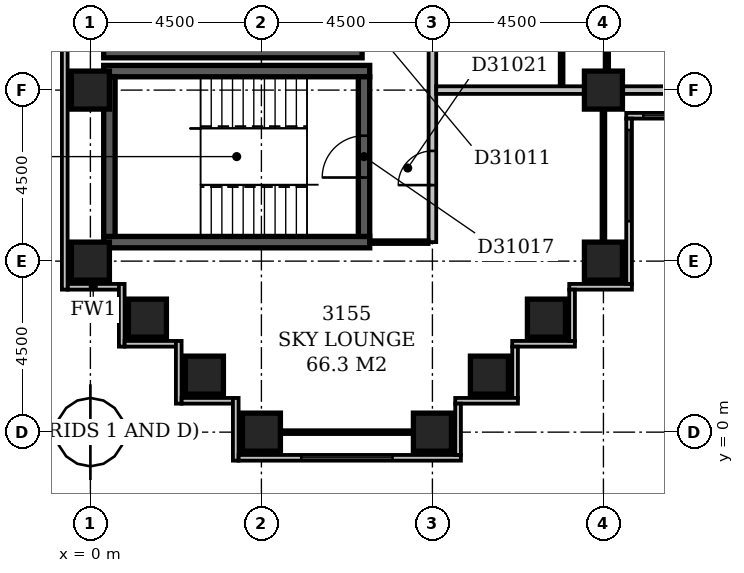
"""IFC4 building model, lengths in metres.
Left out: names, types, materials, properties, quantities, classifications, styles, units other than length and angle.
Written with IfcOpenShell. Run it as: python <this file> out.ifc"""

import sys

from ifc_helpers import new_model, si_unit, direction, frame, frame_2d, origin, origin_2d, place, context, subcontext, project, spatial, rectangle, extrude, element, fill, save


model = new_model("IFC4")
c1 = context("Model", 3, precision=1e-05, world=origin(), true_north=direction((0.0, 1.0)))
c2 = subcontext(c1, "Body", "Model", "MODEL_VIEW")
j1 = project(units=[si_unit("LENGTHUNIT", "METRE"), si_unit("PLANEANGLEUNIT", "RADIAN")], contexts=[c1])
p1 = place(None, origin())
s1 = spatial("IfcSite", under=j1, at=p1, CompositionType="ELEMENT")
p2 = place(p1, origin())
s2 = spatial("IfcBuilding", under=s1, at=p2, CompositionType="ELEMENT")
p3 = place(p2, frame((0.0, 0.0, 126.8)))
s3 = spatial("IfcBuildingStorey", under=s2, at=p3, CompositionType="ELEMENT", Elevation=126.8)
for number, where, z_axis, x_axis in (
    (1, (0.35, 5.0, -0.3), (0.0, 0.0, 1.0), (1.0, 0.0, 0.0)),
    (2, (0.35, 9.5, -0.3), (0.0, 0.0, 1.0), (1.0, 0.0, 0.0)),
):
    element("IfcWall", number, at=place(p3, frame(where, z_axis=z_axis, x_axis=x_axis)), inside=s3, PredefinedType="SHEAR", context=c2, shape_type="SweptSolid", body=[
        extrude(rectangle(XDim=7.0, YDim=0.3, at=frame_2d((3.5, 0.0))), origin(), (0.0, 0.0, 1.0), 3.6),
    ])
p4 = place(p3, frame((0.35, 10.0, -0.3), z_axis=(0.0, 0.0, 1.0), x_axis=(1.0, 0.0, 0.0)))
e3 = element("IfcWall", 3, at=p4, inside=s3, PredefinedType="SHEAR", context=c2, shape_type="SweptSolid", body=[
    extrude(rectangle(XDim=6.8, YDim=0.3, at=frame_2d((3.4, 0.0))), origin(), (0.0, 0.0, 1.0), 3.6),
])
p5 = place(p3, frame((0.5, 5.15, -0.3), z_axis=(0.0, 0.0, 1.0), x_axis=(0.0, 1.0, 0.0)))
e4 = element("IfcWall", 4, at=p5, inside=s3, PredefinedType="SHEAR", context=c2, shape_type="SweptSolid", body=[
    extrude(rectangle(XDim=4.2, YDim=0.3, at=frame_2d((2.1, 0.0))), origin(), (0.0, 0.0, 1.0), 3.6),
])
p6 = place(p3, frame((7.2, 5.15, -0.3), z_axis=(0.0, 0.0, 1.0), x_axis=(0.0, 1.0, 0.0)))
e5 = element("IfcWall", 5, at=p6, inside=s3, PredefinedType="SHEAR", context=c2, shape_type="SweptSolid", body=[
    extrude(rectangle(XDim=4.2, YDim=0.3, at=frame_2d((2.1, 0.0))), origin(), (0.0, 0.0, 1.0), 3.6),
])
p7 = place(p6, frame((1.55, 0.0, 0.3)))
e6 = element("IfcOpeningElement", 6, at=p7, cuts=e5, PredefinedType="OPENING", context=c2, shape_type="SweptSolid", body=[
    extrude(rectangle(XDim=1.1, YDim=2.1, at=frame_2d((0.55, 1.05))), frame((0.0, 0.162, 0.0), z_axis=(0.0, -1.0, 0.0), x_axis=(1.0, 0.0, 0.0)), (0.0, 0.0, 1.0), 0.324),
])
for number, where, z_axis, x_axis in (
    (7, (4.5, 0.0, -0.3), (0.0, 0.0, 1.0), (1.0, 0.0, 0.0)),
    (8, (9.0, 0.0, -0.3), (0.0, 0.0, 1.0), (1.0, 0.0, 0.0)),
    (9, (3.0, 1.5, -0.3), (0.0, 0.0, 1.0), (1.0, 0.0, 0.0)),
    (10, (10.5, 1.5, -0.3), (0.0, 0.0, 1.0), (1.0, 0.0, 0.0)),
    (11, (1.5, 3.0, -0.3), (0.0, 0.0, 1.0), (1.0, 0.0, 0.0)),
    (12, (12.0, 3.0, -0.3), (0.0, 0.0, 1.0), (1.0, 0.0, 0.0)),
    (13, (0.0, 4.5, -0.3), (0.0, 0.0, 1.0), (1.0, 0.0, 0.0)),
    (14, (13.5, 4.5, -0.3), (0.0, 0.0, 1.0), (1.0, 0.0, 0.0)),
    (15, (0.0, 9.0, -0.3), (0.0, 0.0, 1.0), (1.0, 0.0, 0.0)),
    (16, (13.5, 9.0, -0.3), (0.0, 0.0, 1.0), (1.0, 0.0, 0.0)),
):
    element("IfcColumn", number, at=place(p3, frame(where, z_axis=z_axis, x_axis=x_axis)), inside=s3, PredefinedType="COLUMN", context=c2, shape_type="SweptSolid", body=[
        extrude(rectangle(XDim=1.0, YDim=1.0, at=origin_2d()), origin(), (0.0, 0.0, 1.0), 3.6),
    ])
p8 = place(p3, frame((9.675, -0.6, 0.0), z_axis=(0.0, 0.0, 1.0), x_axis=(0.0, 1.0, 0.0)))
e17 = element("IfcWall", 17, at=p8, inside=s3, PredefinedType="STANDARD", context=c2, shape_type="SweptSolid", body=[
    extrude(rectangle(XDim=1.35, YDim=0.15, at=frame_2d((0.675, 0.0))), origin(), (0.0, 0.0, 1.0), 2.7),
])
p9 = place(p3, frame((9.6, 0.825, 0.0), z_axis=(0.0, 0.0, 1.0), x_axis=(1.0, 0.0, 0.0)))
e18 = element("IfcWall", 18, at=p9, inside=s3, PredefinedType="STANDARD", context=c2, shape_type="SweptSolid", body=[
    extrude(rectangle(XDim=1.65, YDim=0.15, at=frame_2d((0.825, 0.0))), origin(), (0.0, 0.0, 1.0), 2.7),
])
p10 = place(p3, frame((11.175, 0.9, 0.0), z_axis=(0.0, 0.0, 1.0), x_axis=(0.0, 1.0, 0.0)))
e19 = element("IfcWall", 19, at=p10, inside=s3, PredefinedType="STANDARD", context=c2, shape_type="SweptSolid", body=[
    extrude(rectangle(XDim=1.35, YDim=0.15, at=frame_2d((0.675, 0.0))), origin(), (0.0, 0.0, 1.0), 2.7),
])
p11 = place(p3, frame((11.1, 2.325, 0.0), z_axis=(0.0, 0.0, 1.0), x_axis=(1.0, 0.0, 0.0)))
e20 = element("IfcWall", 20, at=p11, inside=s3, PredefinedType="STANDARD", context=c2, shape_type="SweptSolid", body=[
    extrude(rectangle(XDim=1.65, YDim=0.15, at=frame_2d((0.825, 0.0))), origin(), (0.0, 0.0, 1.0), 2.7),
])
p12 = place(p3, frame((12.675, 2.4, 0.0), z_axis=(0.0, 0.0, 1.0), x_axis=(0.0, 1.0, 0.0)))
e21 = element("IfcWall", 21, at=p12, inside=s3, PredefinedType="STANDARD", context=c2, shape_type="SweptSolid", body=[
    extrude(rectangle(XDim=1.35, YDim=0.15, at=frame_2d((0.675, 0.0))), origin(), (0.0, 0.0, 1.0), 2.7),
])
p13 = place(p3, frame((12.6, 3.825, 0.0), z_axis=(0.0, 0.0, 1.0), x_axis=(1.0, 0.0, 0.0)))
e22 = element("IfcWall", 22, at=p13, inside=s3, PredefinedType="STANDARD", context=c2, shape_type="SweptSolid", body=[
    extrude(rectangle(XDim=1.65, YDim=0.15, at=frame_2d((0.825, 0.0))), origin(), (0.0, 0.0, 1.0), 2.7),
])
p14 = place(p3, frame((14.175, 3.9, 0.0), z_axis=(0.0, 0.0, 1.0), x_axis=(0.0, 1.0, 0.0)))
e23 = element("IfcWall", 23, at=p14, inside=s3, PredefinedType="STANDARD", context=c2, shape_type="SweptSolid", body=[
    extrude(rectangle(XDim=4.35, YDim=0.15, at=frame_2d((2.175, 0.0))), origin(), (0.0, 0.0, 1.0), 2.7),
])
p15 = place(p14, frame((1.65, 0.0, 0.6)))
e24 = element("IfcOpeningElement", 24, at=p15, cuts=e23, PredefinedType="OPENING", context=c2, shape_type="SweptSolid", body=[
    extrude(rectangle(XDim=2.4, YDim=1.8, at=frame_2d((1.2, 0.9))), frame((0.0, 0.087, 0.0), z_axis=(0.0, -1.0, 0.0), x_axis=(1.0, 0.0, 0.0)), (0.0, 0.0, 1.0), 0.174),
])
p16 = place(p3, frame((14.1, 8.325, 0.0), z_axis=(0.0, 0.0, 1.0), x_axis=(1.0, 0.0, 0.0)))
e25 = element("IfcWall", 25, at=p16, inside=s3, PredefinedType="STANDARD", context=c2, shape_type="SweptSolid", body=[
    extrude(rectangle(XDim=4.65, YDim=0.15, at=frame_2d((2.325, 0.0))), origin(), (0.0, 0.0, 1.0), 2.7),
])
p17 = place(p16, frame((0.45, 0.0, 0.6)))
e26 = element("IfcOpeningElement", 26, at=p17, cuts=e25, PredefinedType="OPENING", context=c2, shape_type="SweptSolid", body=[
    extrude(rectangle(XDim=2.4, YDim=1.8, at=frame_2d((1.2, 0.9))), frame((0.0, 0.087, 0.0), z_axis=(0.0, -1.0, 0.0), x_axis=(1.0, 0.0, 0.0)), (0.0, 0.0, 1.0), 0.174),
])
p18 = place(p3, frame((-0.675, 59.1, 0.0), z_axis=(0.0, 0.0, 1.0), x_axis=(0.0, -1.0, 0.0)))
e27 = element("IfcWall", 27, at=p18, inside=s3, PredefinedType="STANDARD", context=c2, shape_type="SweptSolid", body=[
    extrude(rectangle(XDim=55.35, YDim=0.15, at=frame_2d((27.675, 0.0))), origin(), (0.0, 0.0, 1.0), 2.7),
])
p19 = place(p18, frame((42.15, 0.0, 0.6)))
e28 = element("IfcOpeningElement", 28, at=p19, cuts=e27, PredefinedType="OPENING", context=c2, shape_type="SweptSolid", body=[
    extrude(rectangle(XDim=2.4, YDim=1.8, at=frame_2d((1.2, 0.9))), frame((0.0, 0.087, 0.0), z_axis=(0.0, -1.0, 0.0), x_axis=(1.0, 0.0, 0.0)), (0.0, 0.0, 1.0), 0.174),
])
p20 = place(p3, frame((-0.6, 3.825, 0.0), z_axis=(0.0, 0.0, 1.0), x_axis=(1.0, 0.0, 0.0)))
e29 = element("IfcWall", 29, at=p20, inside=s3, PredefinedType="STANDARD", context=c2, shape_type="SweptSolid", body=[
    extrude(rectangle(XDim=1.35, YDim=0.15, at=frame_2d((0.675, 0.0))), origin(), (0.0, 0.0, 1.0), 2.7),
])
p21 = place(p3, frame((0.825, 3.9, 0.0), z_axis=(0.0, 0.0, 1.0), x_axis=(0.0, -1.0, 0.0)))
e30 = element("IfcWall", 30, at=p21, inside=s3, PredefinedType="STANDARD", context=c2, shape_type="SweptSolid", body=[
    extrude(rectangle(XDim=1.65, YDim=0.15, at=frame_2d((0.825, 0.0))), origin(), (0.0, 0.0, 1.0), 2.7),
])
p22 = place(p3, frame((0.9, 2.325, 0.0), z_axis=(0.0, 0.0, 1.0), x_axis=(1.0, 0.0, 0.0)))
e31 = element("IfcWall", 31, at=p22, inside=s3, PredefinedType="STANDARD", context=c2, shape_type="SweptSolid", body=[
    extrude(rectangle(XDim=1.35, YDim=0.15, at=frame_2d((0.675, 0.0))), origin(), (0.0, 0.0, 1.0), 2.7),
])
p23 = place(p3, frame((2.325, 2.4, 0.0), z_axis=(0.0, 0.0, 1.0), x_axis=(0.0, -1.0, 0.0)))
e32 = element("IfcWall", 32, at=p23, inside=s3, PredefinedType="STANDARD", context=c2, shape_type="SweptSolid", body=[
    extrude(rectangle(XDim=1.65, YDim=0.15, at=frame_2d((0.825, 0.0))), origin(), (0.0, 0.0, 1.0), 2.7),
])
p24 = place(p3, frame((2.4, 0.825, 0.0), z_axis=(0.0, 0.0, 1.0), x_axis=(1.0, 0.0, 0.0)))
e33 = element("IfcWall", 33, at=p24, inside=s3, PredefinedType="STANDARD", context=c2, shape_type="SweptSolid", body=[
    extrude(rectangle(XDim=1.35, YDim=0.15, at=frame_2d((0.675, 0.0))), origin(), (0.0, 0.0, 1.0), 2.7),
])
p25 = place(p3, frame((3.825, 0.9, 0.0), z_axis=(0.0, 0.0, 1.0), x_axis=(0.0, -1.0, 0.0)))
e34 = element("IfcWall", 34, at=p25, inside=s3, PredefinedType="STANDARD", context=c2, shape_type="SweptSolid", body=[
    extrude(rectangle(XDim=1.65, YDim=0.15, at=frame_2d((0.825, 0.0))), origin(), (0.0, 0.0, 1.0), 2.7),
])
p26 = place(p3, frame((3.9, -0.675, 0.0), z_axis=(0.0, 0.0, 1.0), x_axis=(1.0, 0.0, 0.0)))
e35 = element("IfcWall", 35, at=p26, inside=s3, PredefinedType="STANDARD", context=c2, shape_type="SweptSolid", body=[
    extrude(rectangle(XDim=5.85, YDim=0.15, at=frame_2d((2.925, 0.0))), origin(), (0.0, 0.0, 1.0), 2.7),
])
p27 = place(p26, frame((1.65, 0.0, 0.6)))
e36 = element("IfcOpeningElement", 36, at=p27, cuts=e35, PredefinedType="OPENING", context=c2, shape_type="SweptSolid", body=[
    extrude(rectangle(XDim=2.4, YDim=1.8, at=frame_2d((1.2, 0.9))), frame((0.0, 0.087, 0.0), z_axis=(0.0, -1.0, 0.0), x_axis=(1.0, 0.0, 0.0)), (0.0, 0.0, 1.0), 0.174),
])
p28 = place(p3, frame((5.0, 0.0, 0.0), z_axis=(0.0, 0.0, 1.0), x_axis=(1.0, 0.0, 0.0)))
e37 = element("IfcWall", 37, at=p28, inside=s3, PredefinedType="PARTITIONING", context=c2, shape_type="SweptSolid", body=[
    extrude(rectangle(XDim=3.5, YDim=0.1, at=frame_2d((1.75, 0.0))), origin(), (0.0, 0.0, 1.0), 2.7),
])
p29 = place(p3, frame((0.0, 4.5, 0.0), z_axis=(0.0, 0.0, 1.0), x_axis=(0.0, 1.0, 0.0)))
e38 = element("IfcWall", 38, at=p29, inside=s3, PredefinedType="PARTITIONING", context=c2, shape_type="SweptSolid", body=[
    extrude(rectangle(XDim=0.5, YDim=0.1, at=frame_2d((0.25, 0.0))), origin(), (0.0, 0.0, 1.0), 2.7),
])
p30 = place(p3, frame((7.349, 5.0, 0.0), z_axis=(0.0, 0.0, 1.0), x_axis=(1.0, 0.0, 0.0)))
e39 = element("IfcWall", 39, at=p30, inside=s3, PredefinedType="PARTITIONING", context=c2, shape_type="SweptSolid", body=[
    extrude(rectangle(XDim=1.551, YDim=0.1, at=frame_2d((0.775, 0.0))), origin(), (0.0, 0.0, 1.0), 3.3),
])
p31 = place(p3, frame((9.0, 5.0, 0.0), z_axis=(0.0, 0.0, 1.0), x_axis=(0.0, 1.0, 0.0)))
e40 = element("IfcWall", 40, at=p31, inside=s3, PredefinedType="PARTITIONING", context=c2, shape_type="SweptSolid", body=[
    extrude(rectangle(XDim=27.75, YDim=0.2, at=frame_2d((13.875, 0.0))), origin(), (0.0, 0.0, 1.0), 3.3),
])
p32 = place(p31, frame((17.8, 0.0, 0.0)))
e41 = element("IfcOpeningElement", 41, at=p32, cuts=e40, PredefinedType="OPENING", context=c2, shape_type="SweptSolid", body=[
    extrude(rectangle(XDim=1.0, YDim=2.1, at=frame_2d((0.5, 1.05))), frame((0.0, 0.112, 0.0), z_axis=(0.0, -1.0, 0.0), x_axis=(1.0, 0.0, 0.0)), (0.0, 0.0, 1.0), 0.224),
])
p33 = place(p31, frame((14.95, 0.0, 0.0)))
e42 = element("IfcOpeningElement", 42, at=p33, cuts=e40, PredefinedType="OPENING", context=c2, shape_type="SweptSolid", body=[
    extrude(rectangle(XDim=1.0, YDim=2.1, at=frame_2d((0.5, 1.05))), frame((0.0, 0.112, 0.0), z_axis=(0.0, -1.0, 0.0), x_axis=(1.0, 0.0, 0.0)), (0.0, 0.0, 1.0), 0.224),
])
p34 = place(p31, frame((9.3, 0.0, 0.0)))
e43 = element("IfcOpeningElement", 43, at=p34, cuts=e40, PredefinedType="OPENING", context=c2, shape_type="SweptSolid", body=[
    extrude(rectangle(XDim=1.0, YDim=2.1, at=frame_2d((0.5, 1.05))), frame((0.0, 0.112, 0.0), z_axis=(0.0, -1.0, 0.0), x_axis=(1.0, 0.0, 0.0)), (0.0, 0.0, 1.0), 0.224),
])
p35 = place(p31, frame((1.5, 0.0, 0.0)))
e44 = element("IfcOpeningElement", 44, at=p35, cuts=e40, PredefinedType="OPENING", context=c2, shape_type="SweptSolid", body=[
    extrude(rectangle(XDim=0.9, YDim=2.1, at=frame_2d((0.45, 1.05))), frame((0.0, 0.112, 0.0), z_axis=(0.0, -1.0, 0.0), x_axis=(1.0, 0.0, 0.0)), (0.0, 0.0, 1.0), 0.224),
])
p36 = place(p3, frame((13.5, 5.0, 0.0), z_axis=(0.0, 0.0, 1.0), x_axis=(0.0, 1.0, 0.0)))
e45 = element("IfcWall", 45, at=p36, inside=s3, PredefinedType="PARTITIONING", context=c2, shape_type="SweptSolid", body=[
    extrude(rectangle(XDim=3.5, YDim=0.1, at=frame_2d((1.75, 0.0))), origin(), (0.0, 0.0, 1.0), 2.7),
])
p37 = place(p3, frame((9.1, 9.0, 0.0), z_axis=(0.0, 0.0, 1.0), x_axis=(1.0, 0.0, 0.0)))
e46 = element("IfcWall", 46, at=p37, inside=s3, PredefinedType="PARTITIONING", context=c2, shape_type="SweptSolid", body=[
    extrude(rectangle(XDim=3.9, YDim=0.2, at=frame_2d((1.95, 0.0))), origin(), (0.0, 0.0, 1.0), 3.3),
])
p38 = place(p3, frame((14.0, 9.0, 0.0), z_axis=(0.0, 0.0, 1.0), x_axis=(1.0, 0.0, 0.0)))
e47 = element("IfcWall", 47, at=p38, inside=s3, PredefinedType="PARTITIONING", context=c2, shape_type="SweptSolid", body=[
    extrude(rectangle(XDim=3.5, YDim=0.2, at=frame_2d((1.75, 0.0))), origin(), (0.0, 0.0, 1.0), 2.7),
])
p39 = place(p3, frame((12.4, 9.1, 0.0), z_axis=(0.0, 0.0, 1.0), x_axis=(0.0, 1.0, 0.0)))
e48 = element("IfcWall", 48, at=p39, inside=s3, PredefinedType="PARTITIONING", context=c2, shape_type="SweptSolid", body=[
    extrude(rectangle(XDim=4.9, YDim=0.1, at=frame_2d((2.45, 0.0))), origin(), (0.0, 0.0, 1.0), 3.3),
])
p40 = place(p39, frame((1.95, 0.0, 0.0)))
e49 = element("IfcOpeningElement", 49, at=p40, cuts=e48, PredefinedType="OPENING", context=c2, shape_type="SweptSolid", body=[
    extrude(rectangle(XDim=0.9, YDim=2.1, at=frame_2d((0.45, 1.05))), frame((0.0, 0.062, 0.0), z_axis=(0.0, -1.0, 0.0), x_axis=(1.0, 0.0, 0.0)), (0.0, 0.0, 1.0), 0.124),
])
p41 = place(p3, frame((13.6, 9.5, 0.0), z_axis=(0.0, 0.0, 1.0), x_axis=(0.0, 1.0, 0.0)))
e50 = element("IfcWall", 50, at=p41, inside=s3, PredefinedType="PARTITIONING", context=c2, shape_type="SweptSolid", body=[
    extrude(rectangle(XDim=8.4, YDim=0.1, at=frame_2d((4.2, 0.0))), origin(), (0.0, 0.0, 1.0), 3.3),
])
p42 = place(p41, frame((1.3, 0.0, 0.0)))
e51 = element("IfcOpeningElement", 51, at=p42, cuts=e50, PredefinedType="OPENING", context=c2, shape_type="SweptSolid", body=[
    extrude(rectangle(XDim=0.9, YDim=2.1, at=frame_2d((0.45, 1.05))), frame((0.0, 0.062, 0.0), z_axis=(0.0, -1.0, 0.0), x_axis=(1.0, 0.0, 0.0)), (0.0, 0.0, 1.0), 0.124),
])
p43 = place(p41, frame((5.8, 0.0, 0.0)))
e52 = element("IfcOpeningElement", 52, at=p43, cuts=e50, PredefinedType="OPENING", context=c2, shape_type="SweptSolid", body=[
    extrude(rectangle(XDim=0.9, YDim=2.1, at=frame_2d((0.45, 1.05))), frame((0.0, 0.062, 0.0), z_axis=(0.0, -1.0, 0.0), x_axis=(1.0, 0.0, 0.0)), (0.0, 0.0, 1.0), 0.124),
])
p44 = place(p15, origin())
e53 = element("IfcWindow", 53, at=p44, inside=s3, PartitioningType="SINGLE_PANEL", PredefinedType="WINDOW", context=c2, shape_type="SweptSolid", body=[
    extrude(rectangle(XDim=2.4, YDim=1.8, at=frame_2d((1.2, 0.9))), frame((0.0, 0.03, 0.0), z_axis=(0.0, -1.0, 0.0), x_axis=(1.0, 0.0, 0.0)), (0.0, 0.0, 1.0), 0.06),
])
fill(e24, e53)
p45 = place(p17, origin())
e54 = element("IfcWindow", 54, at=p45, inside=s3, PartitioningType="SINGLE_PANEL", PredefinedType="WINDOW", context=c2, shape_type="SweptSolid", body=[
    extrude(rectangle(XDim=2.4, YDim=1.8, at=frame_2d((1.2, 0.9))), frame((0.0, 0.03, 0.0), z_axis=(0.0, -1.0, 0.0), x_axis=(1.0, 0.0, 0.0)), (0.0, 0.0, 1.0), 0.06),
])
fill(e26, e54)
p46 = place(p27, origin())
e55 = element("IfcWindow", 55, at=p46, inside=s3, PartitioningType="SINGLE_PANEL", PredefinedType="WINDOW", context=c2, shape_type="SweptSolid", body=[
    extrude(rectangle(XDim=2.4, YDim=1.8, at=frame_2d((1.2, 0.9))), frame((0.0, 0.03, 0.0), z_axis=(0.0, -1.0, 0.0), x_axis=(1.0, 0.0, 0.0)), (0.0, 0.0, 1.0), 0.06),
])
fill(e36, e55)
p47 = place(p7, origin())
e56 = element("IfcDoor", 56, at=p47, inside=s3, OperationType="SINGLE_SWING_LEFT", PredefinedType="DOOR", context=c2, shape_type="SweptSolid", body=[
    extrude(rectangle(XDim=1.1, YDim=2.1, at=frame_2d((0.55, 1.05))), frame((0.0, 0.025, 0.0), z_axis=(0.0, -1.0, 0.0), x_axis=(1.0, 0.0, 0.0)), (0.0, 0.0, 1.0), 0.05),
])
fill(e6, e56)
p48 = place(p35, origin())
e57 = element("IfcDoor", 57, at=p48, inside=s3, OperationType="SINGLE_SWING_LEFT", PredefinedType="DOOR", context=c2, shape_type="SweptSolid", body=[
    extrude(rectangle(XDim=0.9, YDim=2.1, at=frame_2d((0.45, 1.05))), frame((0.0, 0.025, 0.0), z_axis=(0.0, -1.0, 0.0), x_axis=(1.0, 0.0, 0.0)), (0.0, 0.0, 1.0), 0.05),
])
fill(e44, e57)
save(model, sys.argv[1])
